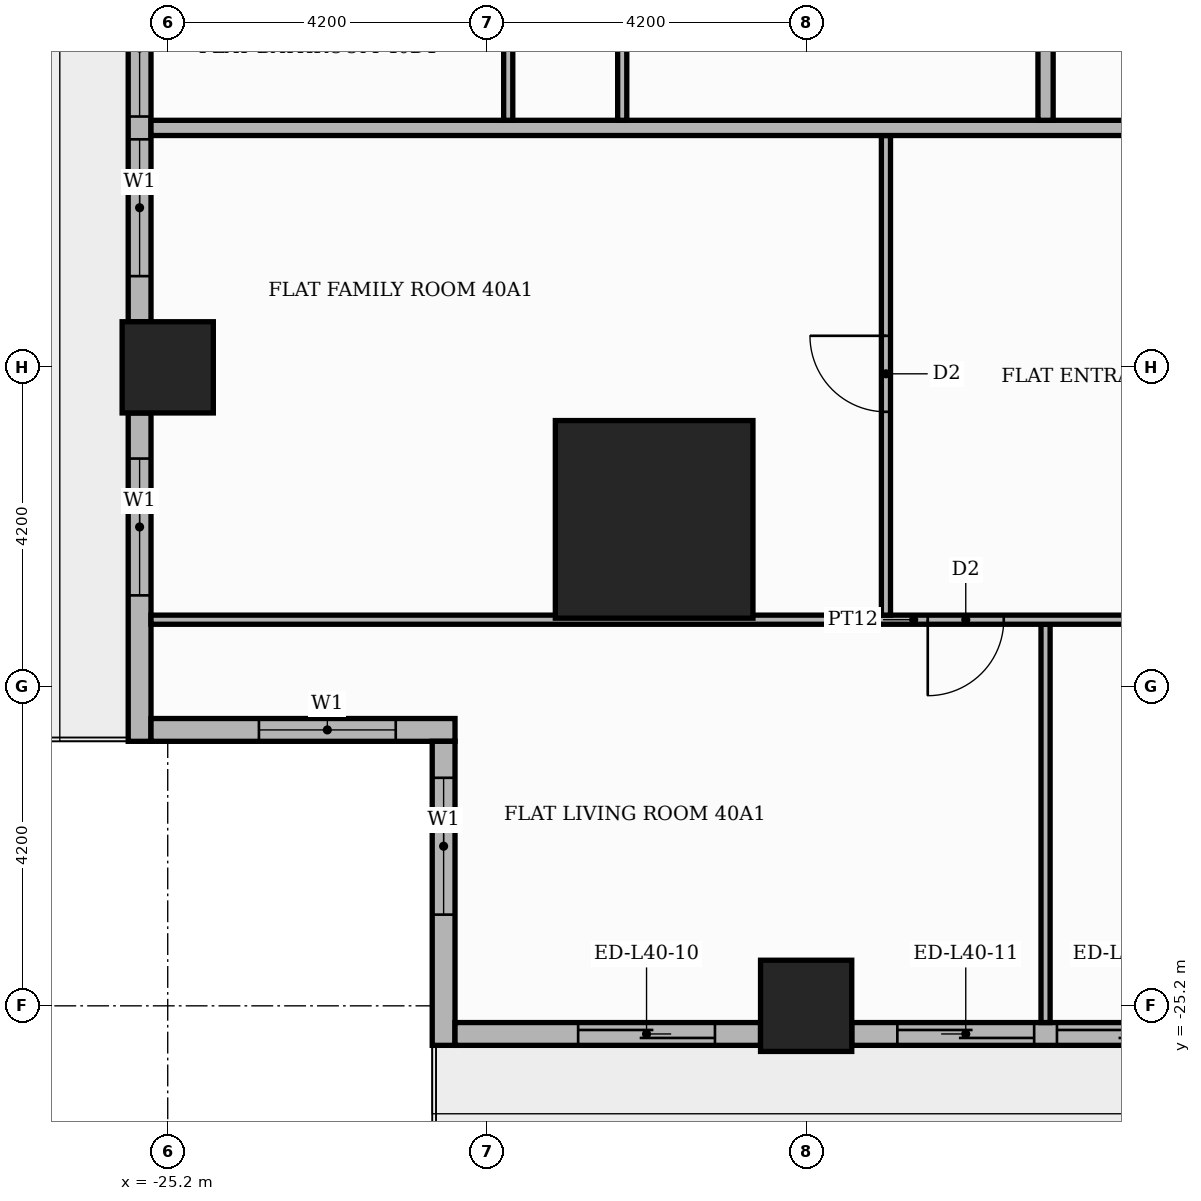
"""IFC4 building model, lengths in metres.
Left out: names, types, materials, properties, quantities, classifications, styles, units other than length and angle.
Written with IfcOpenShell. Run it as: python <this file> out.ifc"""

import sys

from ifc_helpers import new_model, si_unit, direction, frame, frame_2d, origin, origin_2d, place, context, subcontext, project, spatial, rectangle, extrude, element, fill, save


model = new_model("IFC4")
c1 = context("Model", 3, precision=1e-05, world=origin(), true_north=direction((0.0, 1.0)))
c2 = subcontext(c1, "Body", "Model", "MODEL_VIEW")
j1 = project(units=[si_unit("LENGTHUNIT", "METRE"), si_unit("PLANEANGLEUNIT", "RADIAN")], contexts=[c1])
p1 = place(None, origin())
s1 = spatial("IfcSite", under=j1, at=p1, CompositionType="ELEMENT")
p2 = place(p1, origin())
s2 = spatial("IfcBuilding", under=s1, at=p2, CompositionType="ELEMENT")
p3 = place(p2, frame((0.0, 0.0, 168.9)))
s3 = spatial("IfcBuildingStorey", under=s2, at=p3, CompositionType="ELEMENT", Elevation=168.9)
p4 = place(p3, frame((-18.8, -18.8, 0.0), z_axis=(0.0, 0.0, 1.0), x_axis=(1.0, 0.0, 0.0)))
e1 = element("IfcColumn", 1, at=p4, inside=s3, PredefinedType="COLUMN", context=c2, shape_type="SweptSolid", body=[
    extrude(rectangle(XDim=2.6, YDim=2.6, at=origin_2d()), origin(), (0.0, 0.0, 1.0), 3.9),
])
for number, where, z_axis, x_axis in (
    (2, (-16.8, -25.2, 0.0), (0.0, 0.0, 1.0), (1.0, 0.0, 0.0)),
    (3, (-25.2, -16.8, 0.0), (0.0, 0.0, 1.0), (1.0, 0.0, 0.0)),
):
    element("IfcColumn", number, at=place(p3, frame(where, z_axis=z_axis, x_axis=x_axis)), inside=s3, PredefinedType="COLUMN", context=c2, shape_type="SweptSolid", body=[
        extrude(rectangle(XDim=1.2, YDim=1.2, at=origin_2d()), origin(), (0.0, 0.0, 1.0), 3.9),
    ])
p5 = place(p3, frame((-25.57, -9.0, 0.0), z_axis=(0.0, 0.0, 1.0), x_axis=(0.0, -1.0, 0.0)))
e4 = element("IfcWall", 4, at=p5, inside=s3, PredefinedType="STANDARD", context=c2, shape_type="SweptSolid", body=[
    extrude(rectangle(XDim=7.2, YDim=0.3, at=frame_2d((3.6, 0.0))), origin(), (0.0, 0.0, 1.0), 3.48),
])
p6 = place(p5, frame((0.6, 0.0, 0.9)))
e5 = element("IfcOpeningElement", 5, at=p6, cuts=e4, PredefinedType="OPENING", context=c2, shape_type="SweptSolid", body=[
    extrude(rectangle(XDim=1.8, YDim=2.1, at=frame_2d((0.9, 1.05))), frame((0.0, 0.16, 0.0), z_axis=(0.0, -1.0, 0.0), x_axis=(1.0, 0.0, 0.0)), (0.0, 0.0, 1.0), 0.32),
])
p7 = place(p5, frame((2.7, 0.0, 0.9)))
e6 = element("IfcOpeningElement", 6, at=p7, cuts=e4, PredefinedType="OPENING", context=c2, shape_type="SweptSolid", body=[
    extrude(rectangle(XDim=1.8, YDim=2.1, at=frame_2d((0.9, 1.05))), frame((0.0, 0.16, 0.0), z_axis=(0.0, -1.0, 0.0), x_axis=(1.0, 0.0, 0.0)), (0.0, 0.0, 1.0), 0.32),
])
p8 = place(p5, frame((4.8, 0.0, 0.9)))
e7 = element("IfcOpeningElement", 7, at=p8, cuts=e4, PredefinedType="OPENING", context=c2, shape_type="SweptSolid", body=[
    extrude(rectangle(XDim=1.8, YDim=2.1, at=frame_2d((0.9, 1.05))), frame((0.0, 0.16, 0.0), z_axis=(0.0, -1.0, 0.0), x_axis=(1.0, 0.0, 0.0)), (0.0, 0.0, 1.0), 0.32),
])
p9 = place(p3, frame((-25.57, -17.4, 0.0), z_axis=(0.0, 0.0, 1.0), x_axis=(0.0, -1.0, 0.0)))
e8 = element("IfcWall", 8, at=p9, inside=s3, PredefinedType="STANDARD", context=c2, shape_type="SweptSolid", body=[
    extrude(rectangle(XDim=4.32, YDim=0.3, at=frame_2d((2.16, 0.0))), origin(), (0.0, 0.0, 1.0), 3.48),
])
p10 = place(p9, frame((0.6, 0.0, 0.9)))
e9 = element("IfcOpeningElement", 9, at=p10, cuts=e8, PredefinedType="OPENING", context=c2, shape_type="SweptSolid", body=[
    extrude(rectangle(XDim=1.8, YDim=2.1, at=frame_2d((0.9, 1.05))), frame((0.0, 0.16, 0.0), z_axis=(0.0, -1.0, 0.0), x_axis=(1.0, 0.0, 0.0)), (0.0, 0.0, 1.0), 0.32),
])
p11 = place(p3, frame((-25.42, -21.57, 0.0), z_axis=(0.0, 0.0, 1.0), x_axis=(1.0, 0.0, 0.0)))
e10 = element("IfcWall", 10, at=p11, inside=s3, PredefinedType="STANDARD", context=c2, shape_type="SweptSolid", body=[
    extrude(rectangle(XDim=4.0, YDim=0.3, at=frame_2d((2.0, 0.0))), origin(), (0.0, 0.0, 1.0), 3.48),
])
p12 = place(p11, frame((1.42, 0.0, 0.9)))
e11 = element("IfcOpeningElement", 11, at=p12, cuts=e10, PredefinedType="OPENING", context=c2, shape_type="SweptSolid", body=[
    extrude(rectangle(XDim=1.8, YDim=2.1, at=frame_2d((0.9, 1.05))), frame((0.0, 0.16, 0.0), z_axis=(0.0, -1.0, 0.0), x_axis=(1.0, 0.0, 0.0)), (0.0, 0.0, 1.0), 0.32),
])
p13 = place(p3, frame((-21.57, -21.72, 0.0), z_axis=(0.0, 0.0, 1.0), x_axis=(0.0, -1.0, 0.0)))
e12 = element("IfcWall", 12, at=p13, inside=s3, PredefinedType="STANDARD", context=c2, shape_type="SweptSolid", body=[
    extrude(rectangle(XDim=4.0, YDim=0.3, at=frame_2d((2.0, 0.0))), origin(), (0.0, 0.0, 1.0), 3.48),
])
p14 = place(p13, frame((0.48, 0.0, 0.9)))
e13 = element("IfcOpeningElement", 13, at=p14, cuts=e12, PredefinedType="OPENING", context=c2, shape_type="SweptSolid", body=[
    extrude(rectangle(XDim=1.8, YDim=2.1, at=frame_2d((0.9, 1.05))), frame((0.0, 0.16, 0.0), z_axis=(0.0, -1.0, 0.0), x_axis=(1.0, 0.0, 0.0)), (0.0, 0.0, 1.0), 0.32),
])
p15 = place(p3, frame((-21.42, -25.57, 0.0), z_axis=(0.0, 0.0, 1.0), x_axis=(1.0, 0.0, 0.0)))
e14 = element("IfcWall", 14, at=p15, inside=s3, PredefinedType="STANDARD", context=c2, shape_type="SweptSolid", body=[
    extrude(rectangle(XDim=4.02, YDim=0.3, at=frame_2d((2.01, 0.0))), origin(), (0.0, 0.0, 1.0), 3.48),
])
p16 = place(p15, frame((1.62, 0.0, 0.0)))
e15 = element("IfcOpeningElement", 15, at=p16, cuts=e14, PredefinedType="OPENING", context=c2, shape_type="SweptSolid", body=[
    extrude(rectangle(XDim=1.8, YDim=2.4, at=frame_2d((0.9, 1.2))), frame((0.0, 0.16, 0.0), z_axis=(0.0, -1.0, 0.0), x_axis=(1.0, 0.0, 0.0)), (0.0, 0.0, 1.0), 0.32),
])
p17 = place(p3, frame((-16.2, -25.57, 0.0), z_axis=(0.0, 0.0, 1.0), x_axis=(1.0, 0.0, 0.0)))
e16 = element("IfcWall", 16, at=p17, inside=s3, PredefinedType="STANDARD", context=c2, shape_type="SweptSolid", body=[
    extrude(rectangle(XDim=7.2, YDim=0.3, at=frame_2d((3.6, 0.0))), origin(), (0.0, 0.0, 1.0), 3.48),
])
p18 = place(p17, frame((0.6, 0.0, 0.0)))
e17 = element("IfcOpeningElement", 17, at=p18, cuts=e16, PredefinedType="OPENING", context=c2, shape_type="SweptSolid", body=[
    extrude(rectangle(XDim=1.8, YDim=2.4, at=frame_2d((0.9, 1.2))), frame((0.0, 0.16, 0.0), z_axis=(0.0, -1.0, 0.0), x_axis=(1.0, 0.0, 0.0)), (0.0, 0.0, 1.0), 0.32),
])
p19 = place(p17, frame((2.7, 0.0, 0.0)))
e18 = element("IfcOpeningElement", 18, at=p19, cuts=e16, PredefinedType="OPENING", context=c2, shape_type="SweptSolid", body=[
    extrude(rectangle(XDim=1.8, YDim=2.4, at=frame_2d((0.9, 1.2))), frame((0.0, 0.16, 0.0), z_axis=(0.0, -1.0, 0.0), x_axis=(1.0, 0.0, 0.0)), (0.0, 0.0, 1.0), 0.32),
])
p20 = place(p17, frame((4.8, 0.0, 0.9)))
e19 = element("IfcOpeningElement", 19, at=p20, cuts=e16, PredefinedType="OPENING", context=c2, shape_type="SweptSolid", body=[
    extrude(rectangle(XDim=1.8, YDim=2.1, at=frame_2d((0.9, 1.05))), frame((0.0, 0.16, 0.0), z_axis=(0.0, -1.0, 0.0), x_axis=(1.0, 0.0, 0.0)), (0.0, 0.0, 1.0), 0.32),
])
p21 = place(p3, frame((-13.65, -25.42, 0.0), z_axis=(0.0, 0.0, 1.0), x_axis=(0.0, 1.0, 0.0)))
e20 = element("IfcWall", 20, at=p21, inside=s3, PredefinedType="PARTITIONING", context=c2, shape_type="SweptSolid", body=[
    extrude(rectangle(XDim=5.24, YDim=0.12, at=frame_2d((2.62, 0.0))), origin(), (0.0, 0.0, 1.0), 3.48),
])
p22 = place(p3, frame((-25.42, -20.12, 0.0), z_axis=(0.0, 0.0, 1.0), x_axis=(1.0, 0.0, 0.0)))
e21 = element("IfcWall", 21, at=p22, inside=s3, PredefinedType="PARTITIONING", context=c2, shape_type="SweptSolid", body=[
    extrude(rectangle(XDim=20.07, YDim=0.12, at=frame_2d((10.035, 0.0))), origin(), (0.0, 0.0, 1.0), 3.48),
])
p23 = place(p22, frame((10.22, 0.0, 0.0)))
e22 = element("IfcOpeningElement", 22, at=p23, cuts=e21, PredefinedType="OPENING", context=c2, shape_type="SweptSolid", body=[
    extrude(rectangle(XDim=1.0, YDim=2.1, at=frame_2d((0.5, 1.05))), frame((0.0, 0.07, 0.0), z_axis=(0.0, -1.0, 0.0), x_axis=(1.0, 0.0, 0.0)), (0.0, 0.0, 1.0), 0.14),
])
p24 = place(p22, frame((13.42, 0.0, 0.0)))
e23 = element("IfcOpeningElement", 23, at=p24, cuts=e21, PredefinedType="OPENING", context=c2, shape_type="SweptSolid", body=[
    extrude(rectangle(XDim=0.9, YDim=2.1, at=frame_2d((0.45, 1.05))), frame((0.0, 0.07, 0.0), z_axis=(0.0, -1.0, 0.0), x_axis=(1.0, 0.0, 0.0)), (0.0, 0.0, 1.0), 0.14),
])
p25 = place(p3, frame((-15.75, -20.06, 0.0), z_axis=(0.0, 0.0, 1.0), x_axis=(0.0, 1.0, 0.0)))
e24 = element("IfcWall", 24, at=p25, inside=s3, PredefinedType="PARTITIONING", context=c2, shape_type="SweptSolid", body=[
    extrude(rectangle(XDim=6.31, YDim=0.12, at=frame_2d((3.155, 0.0))), origin(), (0.0, 0.0, 1.0), 3.48),
])
p26 = place(p25, frame((2.675, 0.0, 0.0)))
e25 = element("IfcOpeningElement", 25, at=p26, cuts=e24, PredefinedType="OPENING", context=c2, shape_type="SweptSolid", body=[
    extrude(rectangle(XDim=1.0, YDim=2.1, at=frame_2d((0.5, 1.05))), frame((0.0, 0.07, 0.0), z_axis=(0.0, -1.0, 0.0), x_axis=(1.0, 0.0, 0.0)), (0.0, 0.0, 1.0), 0.14),
])
p27 = place(p3, frame((-25.42, -13.65, 0.0), z_axis=(0.0, 0.0, 1.0), x_axis=(1.0, 0.0, 0.0)))
e26 = element("IfcWall", 26, at=p27, inside=s3, PredefinedType="PARTITIONING", context=c2, shape_type="SweptSolid", body=[
    extrude(rectangle(XDim=39.07, YDim=0.2, at=frame_2d((19.535, 0.0))), origin(), (0.0, 0.0, 1.0), 3.48),
])
p28 = place(p27, frame((13.32, 0.0, 0.0)))
e27 = element("IfcOpeningElement", 27, at=p28, cuts=e26, PredefinedType="OPENING", context=c2, shape_type="SweptSolid", body=[
    extrude(rectangle(XDim=1.1, YDim=2.4, at=frame_2d((0.55, 1.2))), frame((0.0, 0.11, 0.0), z_axis=(0.0, -1.0, 0.0), x_axis=(1.0, 0.0, 0.0)), (0.0, 0.0, 1.0), 0.22),
])
p29 = place(p27, frame((21.72, 0.0, 0.0)))
e28 = element("IfcOpeningElement", 28, at=p29, cuts=e26, PredefinedType="OPENING", context=c2, shape_type="SweptSolid", body=[
    extrude(rectangle(XDim=1.1, YDim=2.4, at=frame_2d((0.55, 1.2))), frame((0.0, 0.11, 0.0), z_axis=(0.0, -1.0, 0.0), x_axis=(1.0, 0.0, 0.0)), (0.0, 0.0, 1.0), 0.22),
])
p30 = place(p3, frame((-20.72, -13.55, 0.0), z_axis=(0.0, 0.0, 1.0), x_axis=(0.0, 1.0, 0.0)))
e29 = element("IfcWall", 29, at=p30, inside=s3, PredefinedType="PARTITIONING", context=c2, shape_type="SweptSolid", body=[
    extrude(rectangle(XDim=1.94, YDim=0.12, at=frame_2d((0.97, 0.0))), origin(), (0.0, 0.0, 1.0), 3.48),
])
p31 = place(p3, frame((-19.22, -13.55, 0.0), z_axis=(0.0, 0.0, 1.0), x_axis=(0.0, 1.0, 0.0)))
e30 = element("IfcWall", 30, at=p31, inside=s3, PredefinedType="PARTITIONING", context=c2, shape_type="SweptSolid", body=[
    extrude(rectangle(XDim=4.04, YDim=0.12, at=frame_2d((2.02, 0.0))), origin(), (0.0, 0.0, 1.0), 3.48),
])
p32 = place(p31, frame((1.55, 0.0, 0.0)))
e31 = element("IfcOpeningElement", 31, at=p32, cuts=e30, PredefinedType="OPENING", context=c2, shape_type="SweptSolid", body=[
    extrude(rectangle(XDim=0.9, YDim=2.1, at=frame_2d((0.45, 1.05))), frame((0.0, 0.07, 0.0), z_axis=(0.0, -1.0, 0.0), x_axis=(1.0, 0.0, 0.0)), (0.0, 0.0, 1.0), 0.14),
])
p33 = place(p3, frame((-13.65, -13.55, 0.0), z_axis=(0.0, 0.0, 1.0), x_axis=(0.0, 1.0, 0.0)))
e32 = element("IfcWall", 32, at=p33, inside=s3, PredefinedType="PARTITIONING", context=c2, shape_type="SweptSolid", body=[
    extrude(rectangle(XDim=2.45, YDim=0.2, at=frame_2d((1.225, 0.0))), origin(), (0.0, 0.0, 1.0), 3.48),
])
p34 = place(p7, origin())
e33 = element("IfcWindow", 33, at=p34, inside=s3, PartitioningType="SINGLE_PANEL", PredefinedType="WINDOW", context=c2, shape_type="SweptSolid", body=[
    extrude(rectangle(XDim=1.8, YDim=2.1, at=frame_2d((0.9, 1.05))), frame((0.0, 0.03, 0.0), z_axis=(0.0, -1.0, 0.0), x_axis=(1.0, 0.0, 0.0)), (0.0, 0.0, 1.0), 0.06),
])
fill(e6, e33)
p35 = place(p8, origin())
e34 = element("IfcWindow", 34, at=p35, inside=s3, PartitioningType="SINGLE_PANEL", PredefinedType="WINDOW", context=c2, shape_type="SweptSolid", body=[
    extrude(rectangle(XDim=1.8, YDim=2.1, at=frame_2d((0.9, 1.05))), frame((0.0, 0.03, 0.0), z_axis=(0.0, -1.0, 0.0), x_axis=(1.0, 0.0, 0.0)), (0.0, 0.0, 1.0), 0.06),
])
fill(e7, e34)
p36 = place(p10, origin())
e35 = element("IfcWindow", 35, at=p36, inside=s3, PartitioningType="SINGLE_PANEL", PredefinedType="WINDOW", context=c2, shape_type="SweptSolid", body=[
    extrude(rectangle(XDim=1.8, YDim=2.1, at=frame_2d((0.9, 1.05))), frame((0.0, 0.03, 0.0), z_axis=(0.0, -1.0, 0.0), x_axis=(1.0, 0.0, 0.0)), (0.0, 0.0, 1.0), 0.06),
])
fill(e9, e35)
p37 = place(p12, origin())
e36 = element("IfcWindow", 36, at=p37, inside=s3, PartitioningType="SINGLE_PANEL", PredefinedType="WINDOW", context=c2, shape_type="SweptSolid", body=[
    extrude(rectangle(XDim=1.8, YDim=2.1, at=frame_2d((0.9, 1.05))), frame((0.0, 0.03, 0.0), z_axis=(0.0, -1.0, 0.0), x_axis=(1.0, 0.0, 0.0)), (0.0, 0.0, 1.0), 0.06),
])
fill(e11, e36)
p38 = place(p14, origin())
e37 = element("IfcWindow", 37, at=p38, inside=s3, PartitioningType="SINGLE_PANEL", PredefinedType="WINDOW", context=c2, shape_type="SweptSolid", body=[
    extrude(rectangle(XDim=1.8, YDim=2.1, at=frame_2d((0.9, 1.05))), frame((0.0, 0.03, 0.0), z_axis=(0.0, -1.0, 0.0), x_axis=(1.0, 0.0, 0.0)), (0.0, 0.0, 1.0), 0.06),
])
fill(e13, e37)
p39 = place(p16, origin())
e38 = element("IfcDoor", 38, at=p39, inside=s3, OperationType="SLIDING_TO_RIGHT", PredefinedType="DOOR", context=c2, shape_type="SweptSolid", body=[
    extrude(rectangle(XDim=1.8, YDim=2.4, at=frame_2d((0.9, 1.2))), frame((0.0, 0.025, 0.0), z_axis=(0.0, -1.0, 0.0), x_axis=(1.0, 0.0, 0.0)), (0.0, 0.0, 1.0), 0.05),
])
fill(e15, e38)
p40 = place(p18, origin())
e39 = element("IfcDoor", 39, at=p40, inside=s3, OperationType="SLIDING_TO_LEFT", PredefinedType="DOOR", context=c2, shape_type="SweptSolid", body=[
    extrude(rectangle(XDim=1.8, YDim=2.4, at=frame_2d((0.9, 1.2))), frame((0.0, 0.025, 0.0), z_axis=(0.0, -1.0, 0.0), x_axis=(1.0, 0.0, 0.0)), (0.0, 0.0, 1.0), 0.05),
])
fill(e17, e39)
p41 = place(p19, origin())
e40 = element("IfcDoor", 40, at=p41, inside=s3, OperationType="SLIDING_TO_RIGHT", PredefinedType="DOOR", context=c2, shape_type="SweptSolid", body=[
    extrude(rectangle(XDim=1.8, YDim=2.4, at=frame_2d((0.9, 1.2))), frame((0.0, 0.025, 0.0), z_axis=(0.0, -1.0, 0.0), x_axis=(1.0, 0.0, 0.0)), (0.0, 0.0, 1.0), 0.05),
])
fill(e18, e40)
p42 = place(p26, origin())
e41 = element("IfcDoor", 41, at=p42, inside=s3, OperationType="SINGLE_SWING_RIGHT", PredefinedType="DOOR", context=c2, shape_type="SweptSolid", body=[
    extrude(rectangle(XDim=1.0, YDim=2.1, at=frame_2d((0.5, 1.05))), frame((0.0, 0.025, 0.0), z_axis=(0.0, -1.0, 0.0), x_axis=(1.0, 0.0, 0.0)), (0.0, 0.0, 1.0), 0.05),
])
fill(e25, e41)
p43 = place(p23, frame((1.0, 0.0, 0.0), z_axis=(0.0, 0.0, 1.0), x_axis=(-1.0, 0.0, 0.0)))
e42 = element("IfcDoor", 42, at=p43, inside=s3, OperationType="SINGLE_SWING_LEFT", PredefinedType="DOOR", context=c2, shape_type="SweptSolid", body=[
    extrude(rectangle(XDim=1.0, YDim=2.1, at=frame_2d((0.5, 1.05))), frame((0.0, 0.025, 0.0), z_axis=(0.0, -1.0, 0.0), x_axis=(1.0, 0.0, 0.0)), (0.0, 0.0, 1.0), 0.05),
])
fill(e22, e42)
save(model, sys.argv[1])
